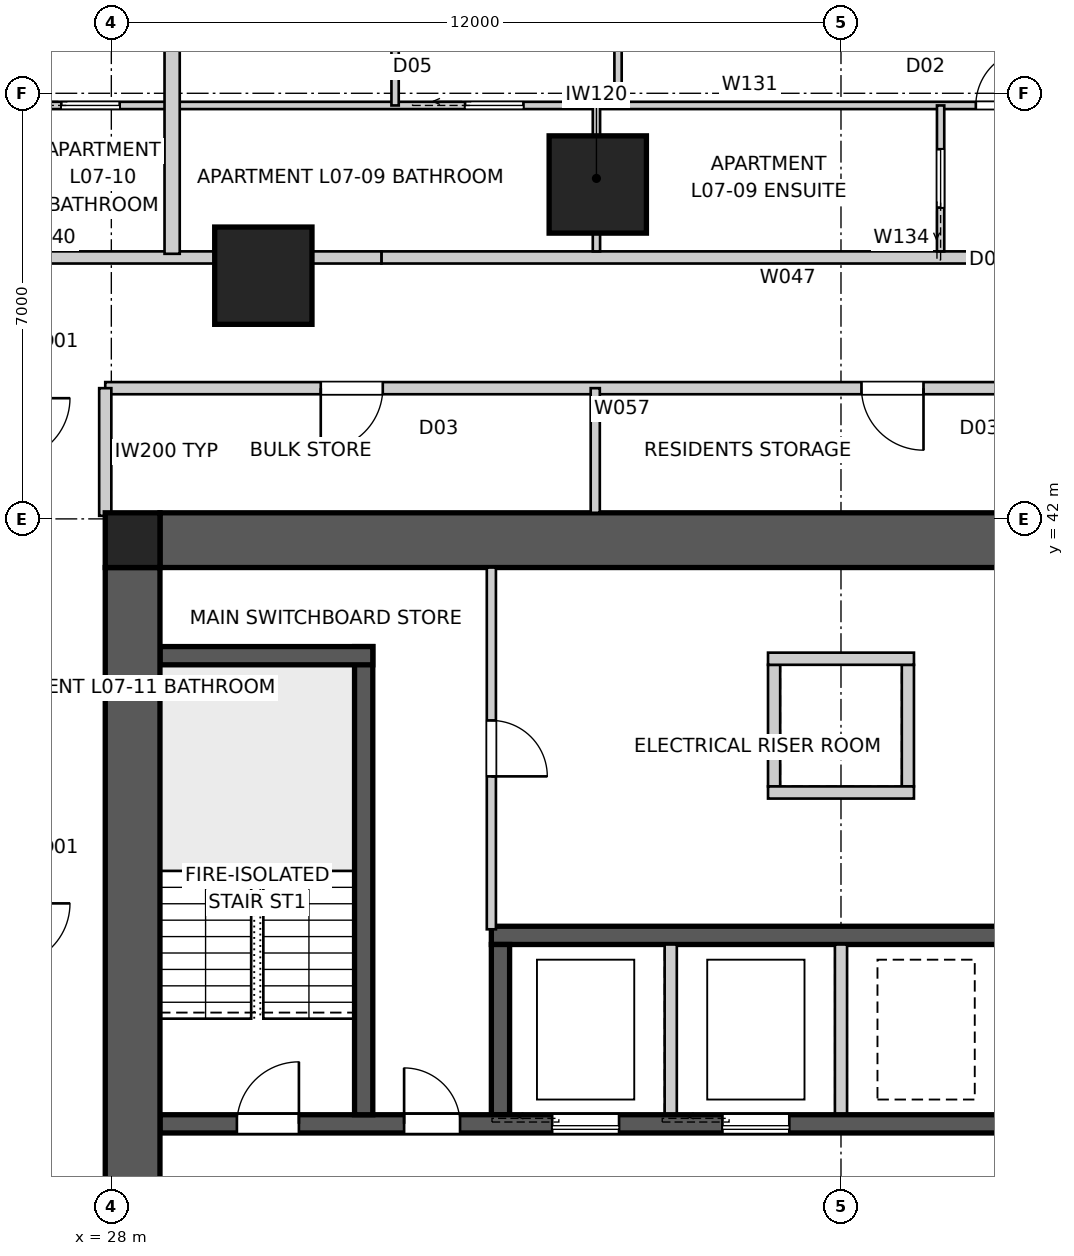
"""IFC4 building model, lengths in metres.
Left out: names, types, materials, properties, quantities, classifications, styles, units other than length and angle.
Written with IfcOpenShell. Run it as: python <this file> out.ifc"""

import sys

from ifc_helpers import new_model, si_unit, direction, frame, frame_2d, origin, origin_2d, place, context, subcontext, project, spatial, polyline, rectangle, outline, extrude, element, fill, save


model = new_model("IFC4")
c1 = context("Model", 3, precision=1e-05, world=origin(), true_north=direction((0.0, 1.0)))
c2 = subcontext(c1, "Body", "Model", "MODEL_VIEW")
j1 = project(units=[si_unit("LENGTHUNIT", "METRE"), si_unit("PLANEANGLEUNIT", "RADIAN")], contexts=[c1])
p1 = place(None, origin())
s1 = spatial("IfcSite", under=j1, at=p1, CompositionType="ELEMENT")
p2 = place(p1, origin())
s2 = spatial("IfcBuilding", under=s1, at=p2, CompositionType="ELEMENT")
p3 = place(p2, frame((0.0, 0.0, 28.6)))
s3 = spatial("IfcBuildingStorey", under=s2, at=p3, CompositionType="ELEMENT", Elevation=28.6)
p4 = place(p3, frame((28.8, 41.65, 0.0), z_axis=(0.0, 0.0, 1.0), x_axis=(1.0, 0.0, 0.0)))
e1 = element("IfcWall", 1, at=p4, inside=s3, PredefinedType="SHEAR", context=c2, shape_type="SweptSolid", body=[
    extrude(outline(polyline([(0.0, -0.45), (22.4, -0.45), (22.4, -0.025), (22.85, -0.025), (22.85, 0.025), (22.4, 0.025), (22.4, 0.45), (0.0, 0.45), (0.0, 0.025), (-0.45, 0.025), (-0.45, -0.025), (0.0, -0.025), (0.0, -0.45)])), origin(), (0.0, 0.0, 1.0), 3.4),
])
p5 = place(p3, frame((28.35, 41.2, 0.0), z_axis=(0.0, 0.0, 1.0), x_axis=(0.0, -1.0, 0.0)))
e2 = element("IfcWall", 2, at=p5, inside=s3, PredefinedType="SHEAR", context=c2, shape_type="SweptSolid", body=[
    extrude(outline(polyline([(0.0, -0.45), (22.4, -0.45), (22.4, -0.025), (22.85, -0.025), (22.85, 0.025), (22.4, 0.025), (22.4, 0.45), (0.0, 0.45), (0.0, 0.025), (-0.45, 0.025), (-0.45, -0.025), (0.0, -0.025), (0.0, -0.45)])), origin(), (0.0, 0.0, 1.0), 3.4),
])
p6 = place(p5, frame((11.14, 0.0, 0.0)))
e3 = element("IfcOpeningElement", 3, at=p6, cuts=e2, PredefinedType="OPENING", context=c2, shape_type="SweptSolid", body=[
    extrude(rectangle(XDim=1.02, YDim=2.4, at=frame_2d((0.51, 1.2))), frame((0.0, 0.46, 0.0), z_axis=(0.0, -1.0, 0.0), x_axis=(1.0, 0.0, 0.0)), (0.0, 0.0, 1.0), 0.92),
])
p7 = place(p3, frame((28.8, 32.05, 0.0), z_axis=(0.0, 0.0, 1.0), x_axis=(1.0, 0.0, 0.0)))
e4 = element("IfcWall", 4, at=p7, inside=s3, PredefinedType="SHEAR", context=c2, shape_type="SweptSolid", body=[
    extrude(rectangle(XDim=22.4, YDim=0.3, at=frame_2d((11.2, 0.0))), origin(), (0.0, 0.0, 1.0), 3.4),
])
p8 = place(p7, frame((19.04, 0.0, 0.0)))
e5 = element("IfcOpeningElement", 5, at=p8, cuts=e4, PredefinedType="OPENING", context=c2, shape_type="SweptSolid", body=[
    extrude(rectangle(XDim=0.92, YDim=2.1, at=frame_2d((0.46, 1.05))), frame((0.0, 0.16, 0.0), z_axis=(0.0, -1.0, 0.0), x_axis=(1.0, 0.0, 0.0)), (0.0, 0.0, 1.0), 0.32),
])
p9 = place(p7, frame((1.265, 0.0, 0.0)))
e6 = element("IfcOpeningElement", 6, at=p9, cuts=e4, PredefinedType="OPENING", context=c2, shape_type="SweptSolid", body=[
    extrude(rectangle(XDim=1.02, YDim=2.1, at=frame_2d((0.51, 1.05))), frame((0.0, 0.16, 0.0), z_axis=(0.0, -1.0, 0.0), x_axis=(1.0, 0.0, 0.0)), (0.0, 0.0, 1.0), 0.32),
])
p10 = place(p7, frame((4.015, 0.0, 0.0)))
e7 = element("IfcOpeningElement", 7, at=p10, cuts=e4, PredefinedType="OPENING", context=c2, shape_type="SweptSolid", body=[
    extrude(rectangle(XDim=0.92, YDim=2.1, at=frame_2d((0.46, 1.05))), frame((0.0, 0.16, 0.0), z_axis=(0.0, -1.0, 0.0), x_axis=(1.0, 0.0, 0.0)), (0.0, 0.0, 1.0), 0.32),
])
p11 = place(p7, frame((6.45, 0.0, 0.0)))
e8 = element("IfcOpeningElement", 8, at=p11, cuts=e4, PredefinedType="OPENING", context=c2, shape_type="SweptSolid", body=[
    extrude(rectangle(XDim=1.1, YDim=2.1, at=frame_2d((0.55, 1.05))), frame((0.0, 0.16, 0.0), z_axis=(0.0, -1.0, 0.0), x_axis=(1.0, 0.0, 0.0)), (0.0, 0.0, 1.0), 0.32),
])
p12 = place(p7, frame((9.25, 0.0, 0.0)))
e9 = element("IfcOpeningElement", 9, at=p12, cuts=e4, PredefinedType="OPENING", context=c2, shape_type="SweptSolid", body=[
    extrude(rectangle(XDim=1.1, YDim=2.1, at=frame_2d((0.55, 1.05))), frame((0.0, 0.16, 0.0), z_axis=(0.0, -1.0, 0.0), x_axis=(1.0, 0.0, 0.0)), (0.0, 0.0, 1.0), 0.32),
])
p13 = place(p7, frame((14.85, 0.0, 0.0)))
e10 = element("IfcOpeningElement", 10, at=p13, cuts=e4, PredefinedType="OPENING", context=c2, shape_type="SweptSolid", body=[
    extrude(rectangle(XDim=1.1, YDim=2.1, at=frame_2d((0.55, 1.05))), frame((0.0, 0.16, 0.0), z_axis=(0.0, -1.0, 0.0), x_axis=(1.0, 0.0, 0.0)), (0.0, 0.0, 1.0), 0.32),
])
p14 = place(p3, frame((34.25, 35.15, 0.0), z_axis=(0.0, 0.0, 1.0), x_axis=(1.0, 0.0, 0.0)))
e11 = element("IfcWall", 11, at=p14, inside=s3, PredefinedType="SHEAR", context=c2, shape_type="SweptSolid", body=[
    extrude(rectangle(XDim=11.5, YDim=0.3, at=frame_2d((5.75, 0.0))), origin(), (0.0, 0.0, 1.0), 3.4),
])
p15 = place(p3, frame((34.4, 32.2, 0.0), z_axis=(0.0, 0.0, 1.0), x_axis=(0.0, 1.0, 0.0)))
e12 = element("IfcWall", 12, at=p15, inside=s3, PredefinedType="SHEAR", context=c2, shape_type="SweptSolid", body=[
    extrude(rectangle(XDim=2.8, YDim=0.3, at=frame_2d((1.4, 0.0))), origin(), (0.0, 0.0, 1.0), 3.4),
])
for number, where, z_axis, x_axis in (
    (13, (37.2, 32.2, 0.0), (0.0, 0.0, 1.0), (0.0, 1.0, 0.0)),
    (14, (40.0, 32.2, 0.0), (0.0, 0.0, 1.0), (0.0, 1.0, 0.0)),
):
    element("IfcWall", number, at=place(p3, frame(where, z_axis=z_axis, x_axis=x_axis)), inside=s3, PredefinedType="SOLIDWALL", context=c2, shape_type="SweptSolid", body=[
        extrude(rectangle(XDim=2.8, YDim=0.2, at=frame_2d((1.4, 0.0))), origin(), (0.0, 0.0, 1.0), 3.4),
    ])
p16 = place(p3, frame((32.15, 32.2, 0.0), z_axis=(0.0, 0.0, 1.0), x_axis=(0.0, 1.0, 0.0)))
e15 = element("IfcWall", 15, at=p16, inside=s3, PredefinedType="SHEAR", context=c2, shape_type="SweptSolid", body=[
    extrude(rectangle(XDim=7.7, YDim=0.3, at=frame_2d((3.85, 0.0))), origin(), (0.0, 0.0, 1.0), 3.4),
])
p17 = place(p3, frame((28.8, 39.75, 0.0), z_axis=(0.0, 0.0, 1.0), x_axis=(1.0, 0.0, 0.0)))
e16 = element("IfcWall", 16, at=p17, inside=s3, PredefinedType="SHEAR", context=c2, shape_type="SweptSolid", body=[
    extrude(rectangle(XDim=3.5, YDim=0.3, at=frame_2d((1.75, 0.0))), origin(), (0.0, 0.0, 1.0), 3.4),
])
for number, where, z_axis, x_axis in (
    (17, (38.9, 37.6, 0.0), (0.0, 0.0, 1.0), (0.0, 1.0, 0.0)),
    (18, (41.1, 37.6, 0.0), (0.0, 0.0, 1.0), (0.0, 1.0, 0.0)),
):
    element("IfcWall", number, at=place(p3, frame(where, z_axis=z_axis, x_axis=x_axis)), inside=s3, PredefinedType="SOLIDWALL", context=c2, shape_type="SweptSolid", body=[
        extrude(rectangle(XDim=2.0, YDim=0.2, at=frame_2d((1.0, 0.0))), origin(), (0.0, 0.0, 1.0), 3.4),
    ])
for number, where, z_axis, x_axis in (
    (19, (38.8, 37.5, 0.0), (0.0, 0.0, 1.0), (1.0, 0.0, 0.0)),
    (20, (38.8, 39.7, 0.0), (0.0, 0.0, 1.0), (1.0, 0.0, 0.0)),
):
    element("IfcWall", number, at=place(p3, frame(where, z_axis=z_axis, x_axis=x_axis)), inside=s3, PredefinedType="SOLIDWALL", context=c2, shape_type="SweptSolid", body=[
        extrude(rectangle(XDim=2.4, YDim=0.2, at=frame_2d((1.2, 0.0))), origin(), (0.0, 0.0, 1.0), 3.4),
    ])
p18 = place(p3, frame((28.35, 41.65, 0.0), z_axis=(0.0, 0.0, 1.0), x_axis=(1.0, 0.0, 0.0)))
e21 = element("IfcColumn", 21, at=p18, inside=s3, PredefinedType="COLUMN", context=c2, shape_type="SweptSolid", body=[
    extrude(rectangle(XDim=0.9, YDim=0.9, at=origin_2d()), origin(), (0.0, 0.0, 1.0), 3.4),
])
for number, where, z_axis, x_axis in (
    (22, (36.0, 47.5, 0.0), (0.0, 0.0, 1.0), (1.0, 0.0, 0.0)),
    (23, (30.5, 46.0, 0.0), (0.0, 0.0, 1.0), (1.0, 0.0, 0.0)),
):
    element("IfcColumn", number, at=place(p3, frame(where, z_axis=z_axis, x_axis=x_axis)), inside=s3, PredefinedType="COLUMN", context=c2, shape_type="SweptSolid", body=[
        extrude(rectangle(XDim=1.6, YDim=1.6, at=origin_2d()), origin(), (0.0, 0.0, 1.0), 3.4),
    ])
p19 = place(p3, frame((47.558, 46.3, 0.0), z_axis=(0.0, 0.0, 1.0), x_axis=(-1.0, 0.0, 0.0)))
e24 = element("IfcWall", 24, at=p19, inside=s3, PredefinedType="PARTITIONING", context=c2, shape_type="SweptSolid", body=[
    extrude(rectangle(XDim=15.117, YDim=0.2, at=frame_2d((7.558, 0.0))), origin(), (0.0, 0.0, 1.0), 3.25),
])
p20 = place(p19, frame((0.729, 0.0, 0.0)))
e25 = element("IfcOpeningElement", 25, at=p20, cuts=e24, PredefinedType="OPENING", context=c2, shape_type="SweptSolid", body=[
    extrude(rectangle(XDim=1.02, YDim=2.34, at=frame_2d((0.51, 1.17))), frame((0.0, 0.11, 0.0), z_axis=(0.0, -1.0, 0.0), x_axis=(1.0, 0.0, 0.0)), (0.0, 0.0, 1.0), 0.22),
])
p21 = place(p3, frame((32.442, 46.3, 0.0), z_axis=(0.0, 0.0, 1.0), x_axis=(-1.0, 0.0, 0.0)))
e26 = element("IfcWall", 26, at=p21, inside=s3, PredefinedType="PARTITIONING", context=c2, shape_type="SweptSolid", body=[
    extrude(rectangle(XDim=1.683, YDim=0.2, at=frame_2d((0.842, 0.0))), origin(), (0.0, 0.0, 1.0), 2.55),
])
p22 = place(p3, frame((30.758, 46.3, 0.0), z_axis=(0.0, 0.0, 1.0), x_axis=(-1.0, 0.0, 0.0)))
e27 = element("IfcWall", 27, at=p22, inside=s3, PredefinedType="PARTITIONING", context=c2, shape_type="SweptSolid", body=[
    extrude(rectangle(XDim=4.458, YDim=0.2, at=frame_2d((2.229, 0.0))), origin(), (0.0, 0.0, 1.0), 3.25),
])
p23 = place(p3, frame((29.0, 56.0, 0.0), z_axis=(0.0, 0.0, 1.0), x_axis=(0.0, -1.0, 0.0)))
e28 = element("IfcWall", 28, at=p23, inside=s3, PredefinedType="PARTITIONING", context=c2, shape_type="SweptSolid", body=[
    extrude(rectangle(XDim=9.64, YDim=0.25, at=frame_2d((4.82, 0.0))), origin(), (0.0, 0.0, 1.0), 3.25),
])
p24 = place(p3, frame((34.25, 41.2, 0.0), z_axis=(0.0, 0.0, 1.0), x_axis=(0.0, -1.0, 0.0)))
e29 = element("IfcWall", 29, at=p24, inside=s3, PredefinedType="SOLIDWALL", context=c2, shape_type="SweptSolid", body=[
    extrude(rectangle(XDim=5.95, YDim=0.15, at=frame_2d((2.975, 0.0))), origin(), (0.0, 0.0, 1.0), 3.25),
])
p25 = place(p24, frame((2.515, 0.0, 0.0)))
e30 = element("IfcOpeningElement", 30, at=p25, cuts=e29, PredefinedType="OPENING", context=c2, shape_type="SweptSolid", body=[
    extrude(rectangle(XDim=0.92, YDim=2.1, at=frame_2d((0.46, 1.05))), frame((0.0, 0.085, 0.0), z_axis=(0.0, -1.0, 0.0), x_axis=(1.0, 0.0, 0.0)), (0.0, 0.0, 1.0), 0.17),
])
p26 = place(p3, frame((52.1, 44.15, 0.0), z_axis=(0.0, 0.0, 1.0), x_axis=(-1.0, 0.0, 0.0)))
e31 = element("IfcWall", 31, at=p26, inside=s3, PredefinedType="PARTITIONING", context=c2, shape_type="SweptSolid", body=[
    extrude(rectangle(XDim=24.2, YDim=0.2, at=frame_2d((12.1, 0.0))), origin(), (0.0, 0.0, 1.0), 3.25),
])
p27 = place(p26, frame((10.743, 0.0, 0.0)))
e32 = element("IfcOpeningElement", 32, at=p27, cuts=e31, PredefinedType="OPENING", context=c2, shape_type="SweptSolid", body=[
    extrude(rectangle(XDim=1.02, YDim=2.1, at=frame_2d((0.51, 1.05))), frame((0.0, 0.11, 0.0), z_axis=(0.0, -1.0, 0.0), x_axis=(1.0, 0.0, 0.0)), (0.0, 0.0, 1.0), 0.22),
])
p28 = place(p26, frame((19.636, 0.0, 0.0)))
e33 = element("IfcOpeningElement", 33, at=p28, cuts=e31, PredefinedType="OPENING", context=c2, shape_type="SweptSolid", body=[
    extrude(rectangle(XDim=1.02, YDim=2.1, at=frame_2d((0.51, 1.05))), frame((0.0, 0.11, 0.0), z_axis=(0.0, -1.0, 0.0), x_axis=(1.0, 0.0, 0.0)), (0.0, 0.0, 1.0), 0.22),
])
p29 = place(p26, frame((3.447, 0.0, 0.0)))
e34 = element("IfcOpeningElement", 34, at=p29, cuts=e31, PredefinedType="OPENING", context=c2, shape_type="SweptSolid", body=[
    extrude(rectangle(XDim=1.02, YDim=2.1, at=frame_2d((0.51, 1.05))), frame((0.0, 0.11, 0.0), z_axis=(0.0, -1.0, 0.0), x_axis=(1.0, 0.0, 0.0)), (0.0, 0.0, 1.0), 0.22),
])
p30 = place(p3, frame((27.9, 44.15, 0.0), z_axis=(0.0, 0.0, 1.0), x_axis=(0.0, -1.0, 0.0)))
e35 = element("IfcWall", 35, at=p30, inside=s3, PredefinedType="PARTITIONING", context=c2, shape_type="SweptSolid", body=[
    extrude(rectangle(XDim=2.1, YDim=0.2, at=frame_2d((1.05, 0.0))), origin(), (0.0, 0.0, 1.0), 3.25),
])
p31 = place(p3, frame((35.958, 42.1, 0.0), z_axis=(0.0, 0.0, 1.0), x_axis=(0.0, 1.0, 0.0)))
e36 = element("IfcWall", 36, at=p31, inside=s3, PredefinedType="SOLIDWALL", context=c2, shape_type="SweptSolid", body=[
    extrude(rectangle(XDim=2.05, YDim=0.15, at=frame_2d((1.025, 0.0))), origin(), (0.0, 0.0, 1.0), 3.25),
])
p32 = place(p3, frame((25.333, 48.8, 0.0), z_axis=(0.0, 0.0, 1.0), x_axis=(1.0, 0.0, 0.0)))
e37 = element("IfcWall", 37, at=p32, inside=s3, PredefinedType="PARTITIONING", context=c2, shape_type="SweptSolid", body=[
    extrude(rectangle(XDim=29.333, YDim=0.12, at=frame_2d((14.667, 0.0))), origin(), (0.0, 0.0, 1.0), 3.25),
])
p33 = place(p32, frame((19.707, 0.0, 0.0)))
e38 = element("IfcOpeningElement", 38, at=p33, cuts=e37, PredefinedType="OPENING", context=c2, shape_type="SweptSolid", body=[
    extrude(rectangle(XDim=0.92, YDim=2.34, at=frame_2d((0.46, 1.17))), frame((0.0, 0.07, 0.0), z_axis=(0.0, -1.0, 0.0), x_axis=(1.0, 0.0, 0.0)), (0.0, 0.0, 1.0), 0.14),
])
p34 = place(p32, frame((23.348, 0.0, 0.0)))
e39 = element("IfcOpeningElement", 39, at=p34, cuts=e37, PredefinedType="OPENING", context=c2, shape_type="SweptSolid", body=[
    extrude(rectangle(XDim=0.92, YDim=2.34, at=frame_2d((0.46, 1.17))), frame((0.0, 0.07, 0.0), z_axis=(0.0, -1.0, 0.0), x_axis=(1.0, 0.0, 0.0)), (0.0, 0.0, 1.0), 0.14),
])
p35 = place(p32, frame((16.884, 0.0, 0.0)))
e40 = element("IfcOpeningElement", 40, at=p35, cuts=e37, PredefinedType="OPENING", context=c2, shape_type="SweptSolid", body=[
    extrude(rectangle(XDim=0.92, YDim=2.34, at=frame_2d((0.46, 1.17))), frame((0.0, 0.07, 0.0), z_axis=(0.0, -1.0, 0.0), x_axis=(1.0, 0.0, 0.0)), (0.0, 0.0, 1.0), 0.14),
])
p36 = place(p32, frame((26.549, 0.0, 0.0)))
e41 = element("IfcOpeningElement", 41, at=p36, cuts=e37, PredefinedType="OPENING", context=c2, shape_type="SweptSolid", body=[
    extrude(rectangle(XDim=0.96, YDim=2.1, at=frame_2d((0.48, 1.05))), frame((0.0, 0.07, 0.0), z_axis=(0.0, -1.0, 0.0), x_axis=(1.0, 0.0, 0.0)), (0.0, 0.0, 1.0), 0.14),
])
p37 = place(p32, frame((1.844, 0.0, 0.0)))
e42 = element("IfcOpeningElement", 42, at=p37, cuts=e37, PredefinedType="OPENING", context=c2, shape_type="SweptSolid", body=[
    extrude(rectangle(XDim=0.96, YDim=2.1, at=frame_2d((0.48, 1.05))), frame((0.0, 0.07, 0.0), z_axis=(0.0, -1.0, 0.0), x_axis=(1.0, 0.0, 0.0)), (0.0, 0.0, 1.0), 0.14),
])
p38 = place(p32, frame((8.484, 0.0, 0.0)))
e43 = element("IfcOpeningElement", 43, at=p38, cuts=e37, PredefinedType="OPENING", context=c2, shape_type="SweptSolid", body=[
    extrude(rectangle(XDim=0.96, YDim=2.1, at=frame_2d((0.48, 1.05))), frame((0.0, 0.07, 0.0), z_axis=(0.0, -1.0, 0.0), x_axis=(1.0, 0.0, 0.0)), (0.0, 0.0, 1.0), 0.14),
])
p39 = place(p3, frame((41.638, 46.4, 0.0), z_axis=(0.0, 0.0, 1.0), x_axis=(0.0, 1.0, 0.0)))
e44 = element("IfcWall", 44, at=p39, inside=s3, PredefinedType="PARTITIONING", context=c2, shape_type="SweptSolid", body=[
    extrude(rectangle(XDim=2.4, YDim=0.12, at=frame_2d((1.2, 0.0))), origin(), (0.0, 0.0, 1.0), 3.25),
])
p40 = place(p39, frame((0.72, 0.0, 0.0)))
e45 = element("IfcOpeningElement", 45, at=p40, cuts=e44, PredefinedType="OPENING", context=c2, shape_type="SweptSolid", body=[
    extrude(rectangle(XDim=0.96, YDim=2.1, at=frame_2d((0.48, 1.05))), frame((0.0, 0.07, 0.0), z_axis=(0.0, -1.0, 0.0), x_axis=(1.0, 0.0, 0.0)), (0.0, 0.0, 1.0), 0.14),
])
p41 = place(p3, frame((35.978, 48.8, 0.0), z_axis=(0.0, 0.0, 1.0), x_axis=(0.0, -1.0, 0.0)))
e46 = element("IfcWall", 46, at=p41, inside=s3, PredefinedType="PARTITIONING", context=c2, shape_type="SweptSolid", body=[
    extrude(rectangle(XDim=2.4, YDim=0.12, at=frame_2d((1.2, 0.0))), origin(), (0.0, 0.0, 1.0), 3.25),
])
p42 = place(p3, frame((36.333, 48.8, 0.0), z_axis=(0.0, 0.0, 1.0), x_axis=(0.0, 1.0, 0.0)))
e47 = element("IfcWall", 47, at=p42, inside=s3, PredefinedType="PARTITIONING", context=c2, shape_type="SweptSolid", body=[
    extrude(rectangle(XDim=7.16, YDim=0.12, at=frame_2d((3.58, 0.0))), origin(), (0.0, 0.0, 1.0), 3.25),
])
p43 = place(p42, frame((3.14, 0.0, 0.0)))
e48 = element("IfcOpeningElement", 48, at=p43, cuts=e47, PredefinedType="OPENING", context=c2, shape_type="SweptSolid", body=[
    extrude(rectangle(XDim=0.92, YDim=2.34, at=frame_2d((0.46, 1.17))), frame((0.0, 0.07, 0.0), z_axis=(0.0, -1.0, 0.0), x_axis=(1.0, 0.0, 0.0)), (0.0, 0.0, 1.0), 0.14),
])
p44 = place(p3, frame((32.667, 55.96, 0.0), z_axis=(0.0, 0.0, 1.0), x_axis=(0.0, -1.0, 0.0)))
e49 = element("IfcWall", 49, at=p44, inside=s3, PredefinedType="PARTITIONING", context=c2, shape_type="SweptSolid", body=[
    extrude(rectangle(XDim=7.16, YDim=0.12, at=frame_2d((3.58, 0.0))), origin(), (0.0, 0.0, 1.0), 3.25),
])
p45 = place(p44, frame((3.1, 0.0, 0.0)))
e50 = element("IfcOpeningElement", 50, at=p45, cuts=e49, PredefinedType="OPENING", context=c2, shape_type="SweptSolid", body=[
    extrude(rectangle(XDim=0.92, YDim=2.34, at=frame_2d((0.46, 1.17))), frame((0.0, 0.07, 0.0), z_axis=(0.0, -1.0, 0.0), x_axis=(1.0, 0.0, 0.0)), (0.0, 0.0, 1.0), 0.14),
])
p46 = place(p9, origin())
e51 = element("IfcDoor", 51, at=p46, inside=s3, OperationType="SINGLE_SWING_RIGHT", PredefinedType="DOOR", context=c2, shape_type="SweptSolid", body=[
    extrude(rectangle(XDim=1.02, YDim=2.1, at=frame_2d((0.51, 1.05))), frame((0.0, 0.025, 0.0), z_axis=(0.0, -1.0, 0.0), x_axis=(1.0, 0.0, 0.0)), (0.0, 0.0, 1.0), 0.05),
])
fill(e6, e51)
p47 = place(p10, origin())
e52 = element("IfcDoor", 52, at=p47, inside=s3, OperationType="SINGLE_SWING_LEFT", PredefinedType="DOOR", context=c2, shape_type="SweptSolid", body=[
    extrude(rectangle(XDim=0.92, YDim=2.1, at=frame_2d((0.46, 1.05))), frame((0.0, 0.025, 0.0), z_axis=(0.0, -1.0, 0.0), x_axis=(1.0, 0.0, 0.0)), (0.0, 0.0, 1.0), 0.05),
])
fill(e7, e52)
p48 = place(p27, origin())
e53 = element("IfcDoor", 53, at=p48, inside=s3, OperationType="SINGLE_SWING_LEFT", PredefinedType="DOOR", context=c2, shape_type="SweptSolid", body=[
    extrude(rectangle(XDim=1.02, YDim=2.1, at=frame_2d((0.51, 1.05))), frame((0.0, 0.025, 0.0), z_axis=(0.0, -1.0, 0.0), x_axis=(1.0, 0.0, 0.0)), (0.0, 0.0, 1.0), 0.05),
])
fill(e32, e53)
p49 = place(p28, origin())
e54 = element("IfcDoor", 54, at=p49, inside=s3, OperationType="SINGLE_SWING_RIGHT", PredefinedType="DOOR", context=c2, shape_type="SweptSolid", body=[
    extrude(rectangle(XDim=1.02, YDim=2.1, at=frame_2d((0.51, 1.05))), frame((0.0, 0.025, 0.0), z_axis=(0.0, -1.0, 0.0), x_axis=(1.0, 0.0, 0.0)), (0.0, 0.0, 1.0), 0.05),
])
fill(e33, e54)
p50 = place(p25, origin())
e55 = element("IfcDoor", 55, at=p50, inside=s3, OperationType="SINGLE_SWING_RIGHT", PredefinedType="DOOR", context=c2, shape_type="SweptSolid", body=[
    extrude(rectangle(XDim=0.92, YDim=2.1, at=frame_2d((0.46, 1.05))), frame((0.0, 0.025, 0.0), z_axis=(0.0, -1.0, 0.0), x_axis=(1.0, 0.0, 0.0)), (0.0, 0.0, 1.0), 0.05),
])
fill(e30, e55)
p51 = place(p40, origin())
e56 = element("IfcDoor", 56, at=p51, inside=s3, OperationType="SLIDING_TO_LEFT", PredefinedType="DOOR", context=c2, shape_type="SweptSolid", body=[
    extrude(rectangle(XDim=0.96, YDim=2.1, at=frame_2d((0.48, 1.05))), frame((0.0, 0.025, 0.0), z_axis=(0.0, -1.0, 0.0), x_axis=(1.0, 0.0, 0.0)), (0.0, 0.0, 1.0), 0.05),
])
fill(e45, e56)
p52 = place(p35, origin())
e57 = element("IfcDoor", 57, at=p52, inside=s3, OperationType="SINGLE_SWING_RIGHT", PredefinedType="DOOR", context=c2, shape_type="SweptSolid", body=[
    extrude(rectangle(XDim=0.92, YDim=2.34, at=frame_2d((0.46, 1.17))), frame((0.0, 0.025, 0.0), z_axis=(0.0, -1.0, 0.0), x_axis=(1.0, 0.0, 0.0)), (0.0, 0.0, 1.0), 0.05),
])
fill(e40, e57)
p53 = place(p37, origin())
e58 = element("IfcDoor", 58, at=p53, inside=s3, OperationType="SLIDING_TO_LEFT", PredefinedType="DOOR", context=c2, shape_type="SweptSolid", body=[
    extrude(rectangle(XDim=0.96, YDim=2.1, at=frame_2d((0.48, 1.05))), frame((0.0, 0.025, 0.0), z_axis=(0.0, -1.0, 0.0), x_axis=(1.0, 0.0, 0.0)), (0.0, 0.0, 1.0), 0.05),
])
fill(e42, e58)
p54 = place(p38, origin())
e59 = element("IfcDoor", 59, at=p54, inside=s3, OperationType="SLIDING_TO_LEFT", PredefinedType="DOOR", context=c2, shape_type="SweptSolid", body=[
    extrude(rectangle(XDim=0.96, YDim=2.1, at=frame_2d((0.48, 1.05))), frame((0.0, 0.025, 0.0), z_axis=(0.0, -1.0, 0.0), x_axis=(1.0, 0.0, 0.0)), (0.0, 0.0, 1.0), 0.05),
])
fill(e43, e59)
p55 = place(p11, origin())
e60 = element("IfcDoor", 60, at=p55, inside=s3, OperationType="SLIDING_TO_LEFT", PredefinedType="DOOR", context=c2, shape_type="SweptSolid", body=[
    extrude(rectangle(XDim=1.1, YDim=2.1, at=frame_2d((0.55, 1.05))), frame((0.0, 0.025, 0.0), z_axis=(0.0, -1.0, 0.0), x_axis=(1.0, 0.0, 0.0)), (0.0, 0.0, 1.0), 0.05),
])
fill(e8, e60)
p56 = place(p12, origin())
e61 = element("IfcDoor", 61, at=p56, inside=s3, OperationType="SLIDING_TO_LEFT", PredefinedType="DOOR", context=c2, shape_type="SweptSolid", body=[
    extrude(rectangle(XDim=1.1, YDim=2.1, at=frame_2d((0.55, 1.05))), frame((0.0, 0.025, 0.0), z_axis=(0.0, -1.0, 0.0), x_axis=(1.0, 0.0, 0.0)), (0.0, 0.0, 1.0), 0.05),
])
fill(e9, e61)
save(model, sys.argv[1])
